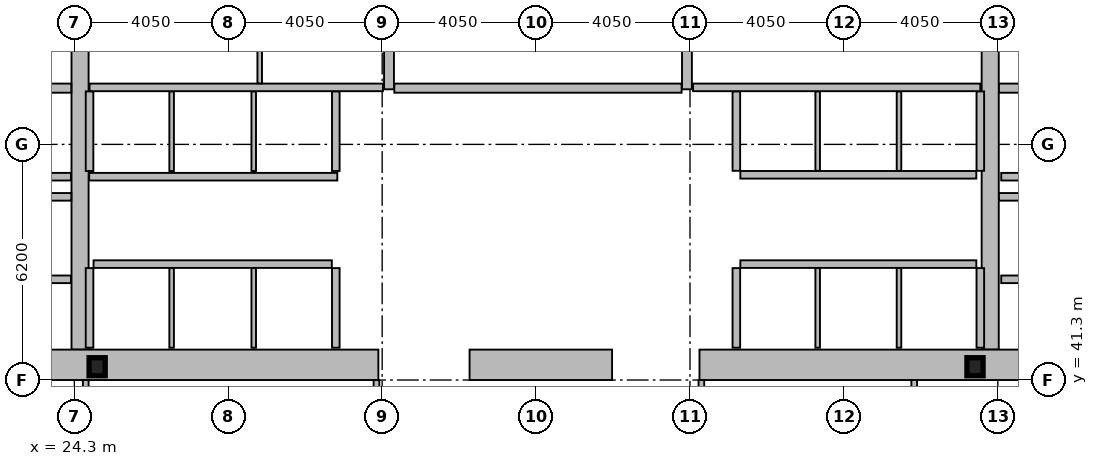
"""IFC4 building model, lengths in metres.
Left out: names, types, materials, properties, quantities, classifications, styles, units other than length and angle.
Written with IfcOpenShell. Run it as: python <this file> out.ifc"""

import sys

from ifc_helpers import new_model, si_unit, direction, frame, frame_2d, origin, origin_2d, place, context, subcontext, project, spatial, rectangle, i_section, extrude, element, fill, save


model = new_model("IFC4")
c1 = context("Model", 3, precision=1e-05, world=origin(), true_north=direction((0.0, 1.0)))
c2 = subcontext(c1, "Body", "Model", "MODEL_VIEW")
j1 = project(units=[si_unit("LENGTHUNIT", "METRE"), si_unit("PLANEANGLEUNIT", "RADIAN")], contexts=[c1])
p1 = place(None, origin())
s1 = spatial("IfcSite", under=j1, at=p1, CompositionType="ELEMENT")
p2 = place(p1, origin())
s2 = spatial("IfcBuilding", under=s1, at=p2, CompositionType="ELEMENT")
p3 = place(p2, frame((0.0, 0.0, 85.8)))
s3 = spatial("IfcBuildingStorey", under=s2, at=p3, CompositionType="ELEMENT", Elevation=85.8)
for number, where, z_axis, x_axis in (
    (1, (24.45, 42.1, 0.0), (0.0, 0.0, 1.0), (0.0, 1.0, 0.0)),
    (2, (48.4, 42.1, 0.0), (0.0, 0.0, 1.0), (0.0, 1.0, 0.0)),
):
    element("IfcWall", number, at=place(p3, frame(where, z_axis=z_axis, x_axis=x_axis)), inside=s3, PredefinedType="SHEAR", context=c2, shape_type="SweptSolid", body=[
        extrude(rectangle(XDim=10.8, YDim=0.45, at=frame_2d((5.4, 0.0))), origin(), (0.0, 0.0, 1.0), 4.62),
    ])
p4 = place(p3, frame((32.3, 41.7, 0.0), z_axis=(0.0, 0.0, 1.0), x_axis=(-1.0, 0.0, 0.0)))
e3 = element("IfcWall", 3, at=p4, inside=s3, PredefinedType="SHEAR", context=c2, shape_type="SweptSolid", body=[
    extrude(rectangle(XDim=11.45, YDim=0.8, at=frame_2d((5.725, 0.0))), origin(), (0.0, 0.0, 1.0), 4.62),
])
p5 = place(p3, frame((38.45, 41.7, 0.0), z_axis=(0.0, 0.0, 1.0), x_axis=(-1.0, 0.0, 0.0)))
e4 = element("IfcWall", 4, at=p5, inside=s3, PredefinedType="SHEAR", context=c2, shape_type="SweptSolid", body=[
    extrude(rectangle(XDim=3.75, YDim=0.8, at=frame_2d((1.875, 0.0))), origin(), (0.0, 0.0, 1.0), 4.62),
])
p6 = place(p3, frame((52.05, 41.7, 0.0), z_axis=(0.0, 0.0, 1.0), x_axis=(-1.0, 0.0, 0.0)))
e5 = element("IfcWall", 5, at=p6, inside=s3, PredefinedType="SHEAR", context=c2, shape_type="SweptSolid", body=[
    extrude(rectangle(XDim=11.3, YDim=0.8, at=frame_2d((5.65, 0.0))), origin(), (0.0, 0.0, 1.0), 4.62),
])
for number, where, z_axis, x_axis in (
    (6, (32.58, 48.95, 0.0), (0.0, 0.0, 1.0), (0.0, 1.0, 0.0)),
    (7, (40.42, 48.95, 0.0), (0.0, 0.0, 1.0), (0.0, 1.0, 0.0)),
):
    element("IfcWall", number, at=place(p3, frame(where, z_axis=z_axis, x_axis=x_axis)), inside=s3, PredefinedType="SHEAR", context=c2, shape_type="SweptSolid", body=[
        extrude(rectangle(XDim=3.95, YDim=0.26, at=frame_2d((1.975, 0.0))), origin(), (0.0, 0.0, 1.0), 4.62),
    ])
p7 = place(p3, frame((17.0, 48.98, 0.0), z_axis=(0.0, 0.0, 1.0), x_axis=(1.0, 0.0, 0.0)))
e8 = element("IfcWall", 8, at=p7, inside=s3, PredefinedType="SHEAR", context=c2, shape_type="SweptSolid", body=[
    extrude(rectangle(XDim=7.22, YDim=0.24, at=frame_2d((3.61, 0.0))), origin(), (0.0, 0.0, 1.0), 4.62),
])
p8 = place(p7, frame((0.22, 0.0, 0.0)))
e9 = element("IfcOpeningElement", 9, at=p8, cuts=e8, PredefinedType="OPENING", context=c2, shape_type="SweptSolid", body=[
    extrude(rectangle(XDim=1.05, YDim=2.15, at=frame_2d((0.525, 1.075))), frame((0.0, 0.13, 0.0), z_axis=(0.0, -1.0, 0.0), x_axis=(1.0, 0.0, 0.0)), (0.0, 0.0, 1.0), 0.26),
])
p9 = place(p3, frame((48.63, 48.98, 0.0), z_axis=(0.0, 0.0, 1.0), x_axis=(1.0, 0.0, 0.0)))
e10 = element("IfcWall", 10, at=p9, inside=s3, PredefinedType="SHEAR", context=c2, shape_type="SweptSolid", body=[
    extrude(rectangle(XDim=7.27, YDim=0.24, at=frame_2d((3.635, 0.0))), origin(), (0.0, 0.0, 1.0), 4.62),
])
p10 = place(p9, frame((6.0, 0.0, 0.0)))
e11 = element("IfcOpeningElement", 11, at=p10, cuts=e10, PredefinedType="OPENING", context=c2, shape_type="SweptSolid", body=[
    extrude(rectangle(XDim=1.05, YDim=2.15, at=frame_2d((0.525, 1.075))), frame((0.0, 0.13, 0.0), z_axis=(0.0, -1.0, 0.0), x_axis=(1.0, 0.0, 0.0)), (0.0, 0.0, 1.0), 0.26),
])
p11 = place(p3, frame((32.72, 48.98, 0.0), z_axis=(0.0, 0.0, 1.0), x_axis=(1.0, 0.0, 0.0)))
e12 = element("IfcWall", 12, at=p11, inside=s3, PredefinedType="SHEAR", context=c2, shape_type="SweptSolid", body=[
    extrude(rectangle(XDim=7.56, YDim=0.24, at=frame_2d((3.78, 0.0))), origin(), (0.0, 0.0, 1.0), 4.62),
])
p12 = place(p11, frame((0.22, 0.0, 0.0)))
e13 = element("IfcOpeningElement", 13, at=p12, cuts=e12, PredefinedType="OPENING", context=c2, shape_type="SweptSolid", body=[
    extrude(rectangle(XDim=1.05, YDim=2.15, at=frame_2d((0.525, 1.075))), frame((0.0, 0.13, 0.0), z_axis=(0.0, -1.0, 0.0), x_axis=(1.0, 0.0, 0.0)), (0.0, 0.0, 1.0), 0.26),
])
for number, where, z_axis, x_axis in (
    (14, (24.9, 41.65, 0.0), (0.0, 0.0, 1.0), (1.0, 0.0, 0.0)),
    (15, (48.0, 41.65, 0.0), (0.0, 0.0, 1.0), (1.0, 0.0, 0.0)),
):
    element("IfcColumn", number, at=place(p3, frame(where, z_axis=z_axis, x_axis=x_axis)), inside=s3, PredefinedType="COLUMN", context=c2, shape_type="SweptSolid", body=[
        extrude(i_section(OverallWidth=0.424, OverallDepth=0.474, WebThickness=0.048, FlangeThickness=0.077, at=origin_2d()), origin(), (0.0, 0.0, 1.0), 4.8),
    ])
p13 = place(p3, frame((51.61, 43.95, 0.0), z_axis=(0.0, 0.0, 1.0), x_axis=(-1.0, 0.0, 0.0)))
e16 = element("IfcWall", 16, at=p13, inside=s3, PredefinedType="PARTITIONING", context=c2, shape_type="SweptSolid", body=[
    extrude(rectangle(XDim=2.92, YDim=0.2, at=frame_2d((1.46, 0.0))), origin(), (0.0, 0.0, 1.0), 4.62),
])
p14 = place(p13, frame((0.81, 0.0, 0.0)))
e17 = element("IfcOpeningElement", 17, at=p14, cuts=e16, PredefinedType="OPENING", context=c2, shape_type="SweptSolid", body=[
    extrude(rectangle(XDim=1.3, YDim=2.18, at=frame_2d((0.65, 1.09))), frame((0.0, 0.11, 0.0), z_axis=(0.0, -1.0, 0.0), x_axis=(1.0, 0.0, 0.0)), (0.0, 0.0, 1.0), 0.22),
])
p15 = place(p3, frame((24.21, 43.95, 0.0), z_axis=(0.0, 0.0, 1.0), x_axis=(-1.0, 0.0, 0.0)))
e18 = element("IfcWall", 18, at=p15, inside=s3, PredefinedType="PARTITIONING", context=c2, shape_type="SweptSolid", body=[
    extrude(rectangle(XDim=2.97, YDim=0.2, at=frame_2d((1.485, 0.0))), origin(), (0.0, 0.0, 1.0), 4.62),
])
p16 = place(p15, frame((0.86, 0.0, 0.0)))
e19 = element("IfcOpeningElement", 19, at=p16, cuts=e18, PredefinedType="OPENING", context=c2, shape_type="SweptSolid", body=[
    extrude(rectangle(XDim=1.3, YDim=2.18, at=frame_2d((0.65, 1.09))), frame((0.0, 0.11, 0.0), z_axis=(0.0, -1.0, 0.0), x_axis=(1.0, 0.0, 0.0)), (0.0, 0.0, 1.0), 0.22),
])
p17 = place(p3, frame((51.61, 46.65, 0.0), z_axis=(0.0, 0.0, 1.0), x_axis=(-1.0, 0.0, 0.0)))
e20 = element("IfcWall", 20, at=p17, inside=s3, PredefinedType="PARTITIONING", context=c2, shape_type="SweptSolid", body=[
    extrude(rectangle(XDim=2.92, YDim=0.2, at=frame_2d((1.46, 0.0))), origin(), (0.0, 0.0, 1.0), 4.62),
])
p18 = place(p17, frame((0.86, 0.0, 0.0)))
e21 = element("IfcOpeningElement", 21, at=p18, cuts=e20, PredefinedType="OPENING", context=c2, shape_type="SweptSolid", body=[
    extrude(rectangle(XDim=1.2, YDim=2.18, at=frame_2d((0.6, 1.09))), frame((0.0, 0.11, 0.0), z_axis=(0.0, -1.0, 0.0), x_axis=(1.0, 0.0, 0.0)), (0.0, 0.0, 1.0), 0.22),
])
p19 = place(p3, frame((24.21, 46.65, 0.0), z_axis=(0.0, 0.0, 1.0), x_axis=(-1.0, 0.0, 0.0)))
e22 = element("IfcWall", 22, at=p19, inside=s3, PredefinedType="PARTITIONING", context=c2, shape_type="SweptSolid", body=[
    extrude(rectangle(XDim=2.97, YDim=0.2, at=frame_2d((1.485, 0.0))), origin(), (0.0, 0.0, 1.0), 4.62),
])
p20 = place(p19, frame((0.91, 0.0, 0.0)))
e23 = element("IfcOpeningElement", 23, at=p20, cuts=e22, PredefinedType="OPENING", context=c2, shape_type="SweptSolid", body=[
    extrude(rectangle(XDim=1.2, YDim=2.18, at=frame_2d((0.6, 1.09))), frame((0.0, 0.11, 0.0), z_axis=(0.0, -1.0, 0.0), x_axis=(1.0, 0.0, 0.0)), (0.0, 0.0, 1.0), 0.22),
])
p21 = place(p3, frame((31.22, 46.65, 0.0), z_axis=(0.0, 0.0, 1.0), x_axis=(-1.0, 0.0, 0.0)))
e24 = element("IfcWall", 24, at=p21, inside=s3, PredefinedType="PARTITIONING", context=c2, shape_type="SweptSolid", body=[
    extrude(rectangle(XDim=6.53, YDim=0.2, at=frame_2d((3.265, 0.0))), origin(), (0.0, 0.0, 1.0), 4.62),
])
p22 = place(p21, frame((4.9, 0.0, 0.0)))
e25 = element("IfcOpeningElement", 25, at=p22, cuts=e24, PredefinedType="OPENING", context=c2, shape_type="SweptSolid", body=[
    extrude(rectangle(XDim=1.1, YDim=2.18, at=frame_2d((0.55, 1.09))), frame((0.0, 0.11, 0.0), z_axis=(0.0, -1.0, 0.0), x_axis=(1.0, 0.0, 0.0)), (0.0, 0.0, 1.0), 0.22),
])
p23 = place(p21, frame((2.74, 0.0, 0.0)))
e26 = element("IfcOpeningElement", 26, at=p23, cuts=e24, PredefinedType="OPENING", context=c2, shape_type="SweptSolid", body=[
    extrude(rectangle(XDim=1.1, YDim=2.18, at=frame_2d((0.55, 1.09))), frame((0.0, 0.11, 0.0), z_axis=(0.0, -1.0, 0.0), x_axis=(1.0, 0.0, 0.0)), (0.0, 0.0, 1.0), 0.22),
])
p24 = place(p21, frame((0.58, 0.0, 0.0)))
e27 = element("IfcOpeningElement", 27, at=p24, cuts=e24, PredefinedType="OPENING", context=c2, shape_type="SweptSolid", body=[
    extrude(rectangle(XDim=1.1, YDim=2.18, at=frame_2d((0.55, 1.09))), frame((0.0, 0.11, 0.0), z_axis=(0.0, -1.0, 0.0), x_axis=(1.0, 0.0, 0.0)), (0.0, 0.0, 1.0), 0.22),
])
p25 = place(p3, frame((21.2, 46.12, 0.0), z_axis=(0.0, 0.0, 1.0), x_axis=(1.0, 0.0, 0.0)))
e28 = element("IfcWall", 28, at=p25, inside=s3, PredefinedType="PARTITIONING", context=c2, shape_type="SweptSolid", body=[
    extrude(rectangle(XDim=3.02, YDim=0.2, at=frame_2d((1.51, 0.0))), origin(), (0.0, 0.0, 1.0), 4.62),
])
p26 = place(p3, frame((48.63, 46.12, 0.0), z_axis=(0.0, 0.0, 1.0), x_axis=(1.0, 0.0, 0.0)))
e29 = element("IfcWall", 29, at=p26, inside=s3, PredefinedType="PARTITIONING", context=c2, shape_type="SweptSolid", body=[
    extrude(rectangle(XDim=3.07, YDim=0.2, at=frame_2d((1.535, 0.0))), origin(), (0.0, 0.0, 1.0), 4.62),
])
for number, where, z_axis, x_axis in (
    (30, (24.7, 46.8, 0.0), (0.0, 0.0, 1.0), (0.0, 1.0, 0.0)),
    (31, (31.18, 46.8, 0.0), (0.0, 0.0, 1.0), (0.0, 1.0, 0.0)),
):
    element("IfcWall", number, at=place(p3, frame(where, z_axis=z_axis, x_axis=x_axis)), inside=s3, PredefinedType="PARTITIONING", context=c2, shape_type="SweptSolid", body=[
        extrude(rectangle(XDim=2.095, YDim=0.2, at=frame_2d((1.047, 0.0))), origin(), (0.0, 0.0, 1.0), 4.62),
    ])
for number, where, z_axis, x_axis in (
    (32, (26.86, 46.8, 0.0), (0.0, 0.0, 1.0), (0.0, 1.0, 0.0)),
    (33, (29.02, 46.8, 0.0), (0.0, 0.0, 1.0), (0.0, 1.0, 0.0)),
):
    element("IfcWall", number, at=place(p3, frame(where, z_axis=z_axis, x_axis=x_axis)), inside=s3, PredefinedType="PARTITIONING", context=c2, shape_type="SweptSolid", body=[
        extrude(rectangle(XDim=2.095, YDim=0.12, at=frame_2d((1.047, 0.0))), origin(), (0.0, 0.0, 1.0), 4.62),
    ])
p27 = place(p3, frame((24.805, 44.35, 0.0), z_axis=(0.0, 0.0, 1.0), x_axis=(1.0, 0.0, 0.0)))
e34 = element("IfcWall", 34, at=p27, inside=s3, PredefinedType="PARTITIONING", context=c2, shape_type="SweptSolid", body=[
    extrude(rectangle(XDim=6.27, YDim=0.2, at=frame_2d((3.135, 0.0))), origin(), (0.0, 0.0, 1.0), 4.62),
])
for number, where, z_axis, x_axis in (
    (35, (24.7, 42.15, 0.0), (0.0, 0.0, 1.0), (0.0, 1.0, 0.0)),
    (36, (31.18, 42.15, 0.0), (0.0, 0.0, 1.0), (0.0, 1.0, 0.0)),
):
    element("IfcWall", number, at=place(p3, frame(where, z_axis=z_axis, x_axis=x_axis)), inside=s3, PredefinedType="PARTITIONING", context=c2, shape_type="SweptSolid", body=[
        extrude(rectangle(XDim=2.095, YDim=0.2, at=frame_2d((1.048, 0.0))), origin(), (0.0, 0.0, 1.0), 4.62),
    ])
for number, where, z_axis, x_axis in (
    (37, (26.86, 42.15, 0.0), (0.0, 0.0, 1.0), (0.0, 1.0, 0.0)),
    (38, (29.02, 42.15, 0.0), (0.0, 0.0, 1.0), (0.0, 1.0, 0.0)),
):
    element("IfcWall", number, at=place(p3, frame(where, z_axis=z_axis, x_axis=x_axis)), inside=s3, PredefinedType="PARTITIONING", context=c2, shape_type="SweptSolid", body=[
        extrude(rectangle(XDim=2.095, YDim=0.12, at=frame_2d((1.048, 0.0))), origin(), (0.0, 0.0, 1.0), 4.62),
    ])
p28 = place(p3, frame((41.825, 46.7, 0.0), z_axis=(0.0, 0.0, 1.0), x_axis=(1.0, 0.0, 0.0)))
e39 = element("IfcWall", 39, at=p28, inside=s3, PredefinedType="PARTITIONING", context=c2, shape_type="SweptSolid", body=[
    extrude(rectangle(XDim=6.21, YDim=0.2, at=frame_2d((3.105, 0.0))), origin(), (0.0, 0.0, 1.0), 4.62),
])
for number, where, z_axis, x_axis in (
    (40, (41.72, 46.805, 0.0), (0.0, 0.0, 1.0), (0.0, 1.0, 0.0)),
    (41, (48.14, 46.805, 0.0), (0.0, 0.0, 1.0), (0.0, 1.0, 0.0)),
):
    element("IfcWall", number, at=place(p3, frame(where, z_axis=z_axis, x_axis=x_axis)), inside=s3, PredefinedType="PARTITIONING", context=c2, shape_type="SweptSolid", body=[
        extrude(rectangle(XDim=2.09, YDim=0.2, at=frame_2d((1.045, 0.0))), origin(), (0.0, 0.0, 1.0), 4.62),
    ])
for number, where, z_axis, x_axis in (
    (42, (43.86, 46.805, 0.0), (0.0, 0.0, 1.0), (0.0, 1.0, 0.0)),
    (43, (46.0, 46.805, 0.0), (0.0, 0.0, 1.0), (0.0, 1.0, 0.0)),
):
    element("IfcWall", number, at=place(p3, frame(where, z_axis=z_axis, x_axis=x_axis)), inside=s3, PredefinedType="PARTITIONING", context=c2, shape_type="SweptSolid", body=[
        extrude(rectangle(XDim=2.09, YDim=0.12, at=frame_2d((1.045, 0.0))), origin(), (0.0, 0.0, 1.0), 4.62),
    ])
p29 = place(p3, frame((41.825, 44.35, 0.0), z_axis=(0.0, 0.0, 1.0), x_axis=(1.0, 0.0, 0.0)))
e44 = element("IfcWall", 44, at=p29, inside=s3, PredefinedType="PARTITIONING", context=c2, shape_type="SweptSolid", body=[
    extrude(rectangle(XDim=6.21, YDim=0.2, at=frame_2d((3.105, 0.0))), origin(), (0.0, 0.0, 1.0), 4.62),
])
for number, where, z_axis, x_axis in (
    (45, (41.72, 42.15, 0.0), (0.0, 0.0, 1.0), (0.0, 1.0, 0.0)),
    (46, (48.14, 42.15, 0.0), (0.0, 0.0, 1.0), (0.0, 1.0, 0.0)),
):
    element("IfcWall", number, at=place(p3, frame(where, z_axis=z_axis, x_axis=x_axis)), inside=s3, PredefinedType="PARTITIONING", context=c2, shape_type="SweptSolid", body=[
        extrude(rectangle(XDim=2.095, YDim=0.2, at=frame_2d((1.048, 0.0))), origin(), (0.0, 0.0, 1.0), 4.62),
    ])
for number, where, z_axis, x_axis in (
    (47, (43.86, 42.15, 0.0), (0.0, 0.0, 1.0), (0.0, 1.0, 0.0)),
    (48, (46.0, 42.15, 0.0), (0.0, 0.0, 1.0), (0.0, 1.0, 0.0)),
):
    element("IfcWall", number, at=place(p3, frame(where, z_axis=z_axis, x_axis=x_axis)), inside=s3, PredefinedType="PARTITIONING", context=c2, shape_type="SweptSolid", body=[
        extrude(rectangle(XDim=2.095, YDim=0.12, at=frame_2d((1.048, 0.0))), origin(), (0.0, 0.0, 1.0), 4.62),
    ])
p30 = place(p3, frame((24.7, 49.0, 0.0), z_axis=(0.0, 0.0, 1.0), x_axis=(1.0, 0.0, 0.0)))
e49 = element("IfcWall", 49, at=p30, inside=s3, PredefinedType="PARTITIONING", context=c2, shape_type="SweptSolid", body=[
    extrude(rectangle(XDim=7.72, YDim=0.2, at=frame_2d((3.86, 0.0))), origin(), (0.0, 0.0, 1.0), 4.62),
])
p31 = place(p30, frame((6.56, 0.0, 0.0)))
e50 = element("IfcOpeningElement", 50, at=p31, cuts=e49, PredefinedType="OPENING", context=c2, shape_type="SweptSolid", body=[
    extrude(rectangle(XDim=0.95, YDim=2.1, at=frame_2d((0.475, 1.05))), frame((0.0, 0.11, 0.0), z_axis=(0.0, -1.0, 0.0), x_axis=(1.0, 0.0, 0.0)), (0.0, 0.0, 1.0), 0.22),
])
p32 = place(p3, frame((29.177, 49.105, 0.0), z_axis=(0.0, 0.0, 1.0), x_axis=(0.0, 1.0, 0.0)))
e51 = element("IfcWall", 51, at=p32, inside=s3, PredefinedType="PARTITIONING", context=c2, shape_type="SweptSolid", body=[
    extrude(rectangle(XDim=3.69, YDim=0.12, at=frame_2d((1.845, 0.0))), origin(), (0.0, 0.0, 1.0), 4.62),
])
p33 = place(p32, frame((1.05, 0.0, 0.0)))
e52 = element("IfcOpeningElement", 52, at=p33, cuts=e51, PredefinedType="OPENING", context=c2, shape_type="SweptSolid", body=[
    extrude(rectangle(XDim=0.9, YDim=2.05, at=frame_2d((0.45, 1.025))), frame((0.0, 0.07, 0.0), z_axis=(0.0, -1.0, 0.0), x_axis=(1.0, 0.0, 0.0)), (0.0, 0.0, 1.0), 0.14),
])
p34 = place(p3, frame((40.58, 49.0, 0.0), z_axis=(0.0, 0.0, 1.0), x_axis=(1.0, 0.0, 0.0)))
e53 = element("IfcWall", 53, at=p34, inside=s3, PredefinedType="PARTITIONING", context=c2, shape_type="SweptSolid", body=[
    extrude(rectangle(XDim=7.56, YDim=0.2, at=frame_2d((3.78, 0.0))), origin(), (0.0, 0.0, 1.0), 4.62),
])
p35 = place(p34, frame((0.16, 0.0, 0.0)))
e54 = element("IfcOpeningElement", 54, at=p35, cuts=e53, PredefinedType="OPENING", context=c2, shape_type="SweptSolid", body=[
    extrude(rectangle(XDim=0.95, YDim=2.1, at=frame_2d((0.475, 1.05))), frame((0.0, 0.11, 0.0), z_axis=(0.0, -1.0, 0.0), x_axis=(1.0, 0.0, 0.0)), (0.0, 0.0, 1.0), 0.22),
])
p36 = place(p3, frame((24.6, 38.28, 0.0), z_axis=(0.0, 0.0, 1.0), x_axis=(0.0, 1.0, 0.0)))
e55 = element("IfcWall", 55, at=p36, inside=s3, PredefinedType="PARTITIONING", context=c2, shape_type="SweptSolid", body=[
    extrude(rectangle(XDim=3.02, YDim=0.15, at=frame_2d((1.51, 0.0))), origin(), (0.0, 0.0, 1.0), 3.81),
])
for number, where, z_axis, x_axis in (
    (56, (32.25, 38.28, 0.0), (0.0, 0.0, 1.0), (0.0, 1.0, 0.0)),
    (57, (40.8, 38.28, 0.0), (0.0, 0.0, 1.0), (0.0, 1.0, 0.0)),
    (58, (46.4, 38.28, 0.0), (0.0, 0.0, 1.0), (0.0, 1.0, 0.0)),
):
    element("IfcWall", number, at=place(p3, frame(where, z_axis=z_axis, x_axis=x_axis)), inside=s3, PredefinedType="PARTITIONING", context=c2, shape_type="SweptSolid", body=[
        extrude(rectangle(XDim=3.02, YDim=0.15, at=frame_2d((1.51, 0.0))), origin(), (0.0, 0.0, 1.0), 4.62),
    ])
p37 = place(p12, origin())
e59 = element("IfcDoor", 59, at=p37, inside=s3, OperationType="SINGLE_SWING_LEFT", PredefinedType="DOOR", context=c2, shape_type="SweptSolid", body=[
    extrude(rectangle(XDim=1.05, YDim=2.15, at=frame_2d((0.525, 1.075))), frame((0.0, 0.025, 0.0), z_axis=(0.0, -1.0, 0.0), x_axis=(1.0, 0.0, 0.0)), (0.0, 0.0, 1.0), 0.05),
])
fill(e13, e59)
p38 = place(p22, origin())
e60 = element("IfcDoor", 60, at=p38, inside=s3, OperationType="SLIDING_TO_LEFT", PredefinedType="DOOR", context=c2, shape_type="SweptSolid", body=[
    extrude(rectangle(XDim=1.1, YDim=2.18, at=frame_2d((0.55, 1.09))), frame((0.0, 0.025, 0.0), z_axis=(0.0, -1.0, 0.0), x_axis=(1.0, 0.0, 0.0)), (0.0, 0.0, 1.0), 0.05),
])
fill(e25, e60)
p39 = place(p23, origin())
e61 = element("IfcDoor", 61, at=p39, inside=s3, OperationType="SLIDING_TO_LEFT", PredefinedType="DOOR", context=c2, shape_type="SweptSolid", body=[
    extrude(rectangle(XDim=1.1, YDim=2.18, at=frame_2d((0.55, 1.09))), frame((0.0, 0.025, 0.0), z_axis=(0.0, -1.0, 0.0), x_axis=(1.0, 0.0, 0.0)), (0.0, 0.0, 1.0), 0.05),
])
fill(e26, e61)
p40 = place(p24, origin())
e62 = element("IfcDoor", 62, at=p40, inside=s3, OperationType="SLIDING_TO_LEFT", PredefinedType="DOOR", context=c2, shape_type="SweptSolid", body=[
    extrude(rectangle(XDim=1.1, YDim=2.18, at=frame_2d((0.55, 1.09))), frame((0.0, 0.025, 0.0), z_axis=(0.0, -1.0, 0.0), x_axis=(1.0, 0.0, 0.0)), (0.0, 0.0, 1.0), 0.05),
])
fill(e27, e62)
p41 = place(p31, origin())
e63 = element("IfcDoor", 63, at=p41, inside=s3, OperationType="SINGLE_SWING_RIGHT", PredefinedType="DOOR", context=c2, shape_type="SweptSolid", body=[
    extrude(rectangle(XDim=0.95, YDim=2.1, at=frame_2d((0.475, 1.05))), frame((0.0, 0.025, 0.0), z_axis=(0.0, -1.0, 0.0), x_axis=(1.0, 0.0, 0.0)), (0.0, 0.0, 1.0), 0.05),
])
fill(e50, e63)
p42 = place(p35, origin())
e64 = element("IfcDoor", 64, at=p42, inside=s3, OperationType="SINGLE_SWING_RIGHT", PredefinedType="DOOR", context=c2, shape_type="SweptSolid", body=[
    extrude(rectangle(XDim=0.95, YDim=2.1, at=frame_2d((0.475, 1.05))), frame((0.0, 0.025, 0.0), z_axis=(0.0, -1.0, 0.0), x_axis=(1.0, 0.0, 0.0)), (0.0, 0.0, 1.0), 0.05),
])
fill(e54, e64)
save(model, sys.argv[1])
